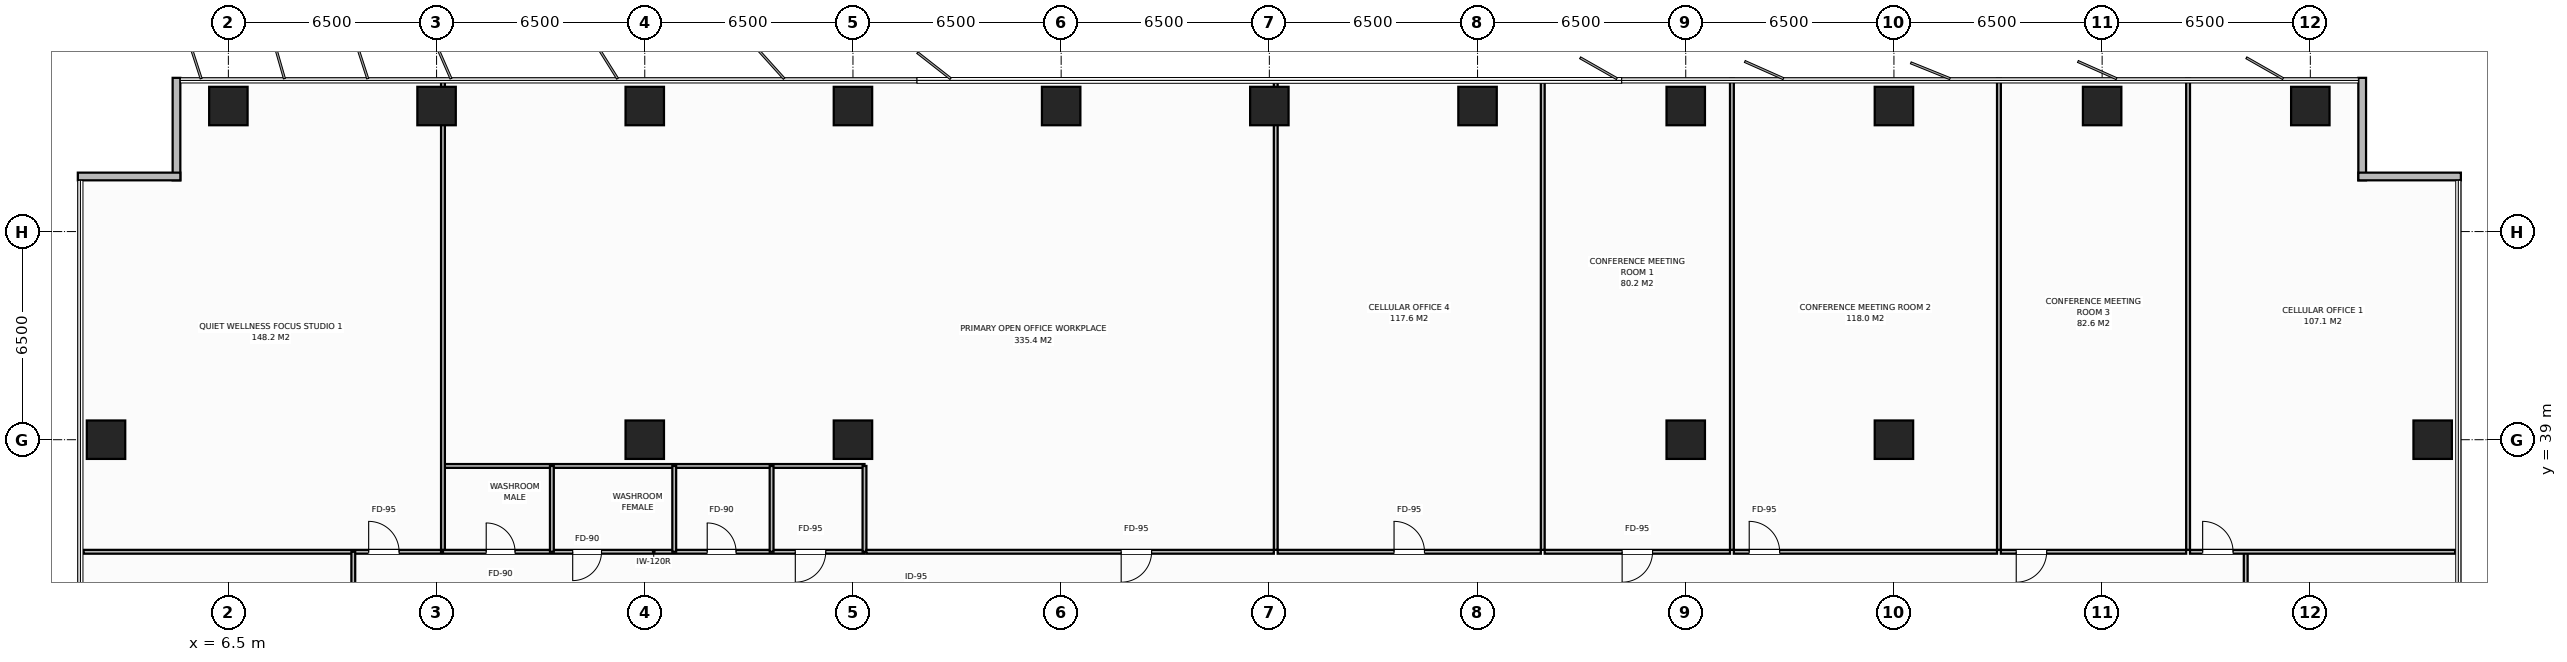
"""IFC4 building model, lengths in metres.
Left out: names, types, materials, properties, quantities, classifications, styles, units other than length and angle.
Written with IfcOpenShell. Run it as: python <this file> out.ifc"""

import sys

from ifc_helpers import new_model, si_unit, direction, frame, frame_2d, origin, origin_2d, place, context, subcontext, project, spatial, rectangle, extrude, element, fill, save


model = new_model("IFC4")
c1 = context("Model", 3, precision=1e-05, world=origin(), true_north=direction((0.0, 1.0)))
c2 = subcontext(c1, "Body", "Model", "MODEL_VIEW")
j1 = project(units=[si_unit("LENGTHUNIT", "METRE"), si_unit("PLANEANGLEUNIT", "RADIAN")], contexts=[c1])
p1 = place(None, origin())
s1 = spatial("IfcSite", under=j1, at=p1, CompositionType="ELEMENT")
p2 = place(p1, origin())
s2 = spatial("IfcBuilding", under=s1, at=p2, CompositionType="ELEMENT")
p3 = place(p2, frame((0.0, 0.0, 105.0)))
s3 = spatial("IfcBuildingStorey", under=s2, at=p3, CompositionType="ELEMENT", Elevation=105.0)
for number, where, z_axis, x_axis in (
    (1, (19.5, 39.0, 0.0), (0.0, 0.0, 1.0), (1.0, 0.0, 0.0)),
    (2, (58.5, 39.0, 0.0), (0.0, 0.0, 1.0), (1.0, 0.0, 0.0)),
    (3, (26.0, 39.0, 0.0), (0.0, 0.0, 1.0), (1.0, 0.0, 0.0)),
    (4, (52.0, 39.0, 0.0), (0.0, 0.0, 1.0), (1.0, 0.0, 0.0)),
    (5, (6.5, 49.42, 0.0), (0.0, 0.0, 1.0), (1.0, 0.0, 0.0)),
    (6, (13.0, 49.42, 0.0), (0.0, 0.0, 1.0), (1.0, 0.0, 0.0)),
    (7, (19.5, 49.42, 0.0), (0.0, 0.0, 1.0), (1.0, 0.0, 0.0)),
    (8, (26.0, 49.42, 0.0), (0.0, 0.0, 1.0), (1.0, 0.0, 0.0)),
    (9, (32.5, 49.42, 0.0), (0.0, 0.0, 1.0), (1.0, 0.0, 0.0)),
    (10, (39.0, 49.42, 0.0), (0.0, 0.0, 1.0), (1.0, 0.0, 0.0)),
    (11, (45.5, 49.42, 0.0), (0.0, 0.0, 1.0), (1.0, 0.0, 0.0)),
    (12, (52.0, 49.42, 0.0), (0.0, 0.0, 1.0), (1.0, 0.0, 0.0)),
    (13, (58.5, 49.42, 0.0), (0.0, 0.0, 1.0), (1.0, 0.0, 0.0)),
    (14, (65.0, 49.42, 0.0), (0.0, 0.0, 1.0), (1.0, 0.0, 0.0)),
    (15, (71.5, 49.42, 0.0), (0.0, 0.0, 1.0), (1.0, 0.0, 0.0)),
    (16, (2.68, 39.0, 0.0), (0.0, 0.0, 1.0), (1.0, 0.0, 0.0)),
    (17, (75.32, 39.0, 0.0), (0.0, 0.0, 1.0), (1.0, 0.0, 0.0)),
):
    element("IfcColumn", number, at=place(p3, frame(where, z_axis=z_axis, x_axis=x_axis)), inside=s3, PredefinedType="COLUMN", context=c2, shape_type="SweptSolid", body=[
        extrude(rectangle(XDim=1.2, YDim=1.2, at=origin_2d()), origin(), (0.0, 0.0, 1.0), 3.8),
    ])
for number, where, z_axis, x_axis in (
    (18, (4.88, 47.1, 0.0), (0.0, 0.0, 1.0), (0.0, 1.0, 0.0)),
    (19, (1.8, 47.22, 0.0), (0.0, 0.0, 1.0), (1.0, 0.0, 0.0)),
    (20, (73.12, 50.3, 0.0), (0.0, 0.0, 1.0), (0.0, -1.0, 0.0)),
    (21, (73.0, 47.22, 0.0), (0.0, 0.0, 1.0), (1.0, 0.0, 0.0)),
):
    element("IfcWall", number, at=place(p3, frame(where, z_axis=z_axis, x_axis=x_axis)), inside=s3, PredefinedType="STANDARD", context=c2, shape_type="SweptSolid", body=[
        extrude(rectangle(XDim=3.2, YDim=0.24, at=frame_2d((1.6, 0.0))), origin(), (0.0, 0.0, 1.0), 3.565),
    ])
p4 = place(p3, frame((69.483, 33.4, 0.0), z_axis=(0.0, 0.0, 1.0), x_axis=(0.0, 1.0, 0.0)))
e22 = element("IfcWall", 22, at=p4, inside=s3, PredefinedType="PARTITIONING", context=c2, shape_type="SweptSolid", body=[
    extrude(rectangle(XDim=2.1, YDim=0.12, at=frame_2d((1.05, 0.0))), origin(), (0.0, 0.0, 1.0), 3.565),
])
p5 = place(p3, frame((13.2, 35.5, 0.0), z_axis=(0.0, 0.0, 1.0), x_axis=(1.0, 0.0, 0.0)))
e23 = element("IfcWall", 23, at=p5, inside=s3, PredefinedType="PARTITIONING", context=c2, shape_type="SweptSolid", body=[
    extrude(rectangle(XDim=13.16, YDim=0.12, at=frame_2d((6.58, 0.0))), origin(), (0.0, 0.0, 1.0), 3.565),
])
p6 = place(p5, frame((1.35, 0.0, 0.0)))
e24 = element("IfcOpeningElement", 24, at=p6, cuts=e23, PredefinedType="OPENING", context=c2, shape_type="SweptSolid", body=[
    extrude(rectangle(XDim=0.9, YDim=2.15, at=frame_2d((0.45, 1.075))), frame((0.0, 0.07, 0.0), z_axis=(0.0, -1.0, 0.0), x_axis=(1.0, 0.0, 0.0)), (0.0, 0.0, 1.0), 0.14),
])
p7 = place(p5, frame((4.05, 0.0, 0.0)))
e25 = element("IfcOpeningElement", 25, at=p7, cuts=e23, PredefinedType="OPENING", context=c2, shape_type="SweptSolid", body=[
    extrude(rectangle(XDim=0.9, YDim=2.15, at=frame_2d((0.45, 1.075))), frame((0.0, 0.07, 0.0), z_axis=(0.0, -1.0, 0.0), x_axis=(1.0, 0.0, 0.0)), (0.0, 0.0, 1.0), 0.14),
])
p8 = place(p5, frame((8.25, 0.0, 0.0)))
e26 = element("IfcOpeningElement", 26, at=p8, cuts=e23, PredefinedType="OPENING", context=c2, shape_type="SweptSolid", body=[
    extrude(rectangle(XDim=0.9, YDim=2.15, at=frame_2d((0.45, 1.075))), frame((0.0, 0.07, 0.0), z_axis=(0.0, -1.0, 0.0), x_axis=(1.0, 0.0, 0.0)), (0.0, 0.0, 1.0), 0.14),
])
p9 = place(p5, frame((11.0, 0.0, 0.0)))
e27 = element("IfcOpeningElement", 27, at=p9, cuts=e23, PredefinedType="OPENING", context=c2, shape_type="SweptSolid", body=[
    extrude(rectangle(XDim=0.95, YDim=2.15, at=frame_2d((0.475, 1.075))), frame((0.0, 0.07, 0.0), z_axis=(0.0, -1.0, 0.0), x_axis=(1.0, 0.0, 0.0)), (0.0, 0.0, 1.0), 0.14),
])
p10 = place(p3, frame((13.2, 38.18, 0.0), z_axis=(0.0, 0.0, 1.0), x_axis=(1.0, 0.0, 0.0)))
e28 = element("IfcWall", 28, at=p10, inside=s3, PredefinedType="PARTITIONING", context=c2, shape_type="SweptSolid", body=[
    extrude(rectangle(XDim=13.16, YDim=0.12, at=frame_2d((6.58, 0.0))), origin(), (0.0, 0.0, 1.0), 3.565),
])
for number, where, z_axis, x_axis in (
    (29, (16.6, 35.5, 0.0), (0.0, 0.0, 1.0), (0.0, 1.0, 0.0)),
    (30, (20.42, 35.5, 0.0), (0.0, 0.0, 1.0), (0.0, 1.0, 0.0)),
    (31, (23.46, 35.5, 0.0), (0.0, 0.0, 1.0), (0.0, 1.0, 0.0)),
    (32, (26.36, 35.5, 0.0), (0.0, 0.0, 1.0), (0.0, 1.0, 0.0)),
):
    element("IfcWall", number, at=place(p3, frame(where, z_axis=z_axis, x_axis=x_axis)), inside=s3, PredefinedType="PARTITIONING", context=c2, shape_type="SweptSolid", body=[
        extrude(rectangle(XDim=2.68, YDim=0.12, at=frame_2d((1.34, 0.0))), origin(), (0.0, 0.0, 1.0), 3.565),
    ])
p11 = place(p3, frame((13.2, 35.56, 0.0), z_axis=(0.0, 0.0, 1.0), x_axis=(0.0, 1.0, 0.0)))
e33 = element("IfcWall", 33, at=p11, inside=s3, PredefinedType="PARTITIONING", context=c2, shape_type="SweptSolid", body=[
    extrude(rectangle(XDim=14.72, YDim=0.12, at=frame_2d((7.36, 0.0))), origin(), (0.0, 0.0, 1.0), 2.965),
])
p12 = place(p3, frame((1.98, 35.5, 0.0), z_axis=(0.0, 0.0, 1.0), x_axis=(1.0, 0.0, 0.0)))
e34 = element("IfcWall", 34, at=p12, inside=s3, PredefinedType="PARTITIONING", context=c2, shape_type="SweptSolid", body=[
    extrude(rectangle(XDim=11.16, YDim=0.12, at=frame_2d((5.58, 0.0))), origin(), (0.0, 0.0, 1.0), 3.565),
])
p13 = place(p12, frame((8.9, 0.0, 0.0)))
e35 = element("IfcOpeningElement", 35, at=p13, cuts=e34, PredefinedType="OPENING", context=c2, shape_type="SweptSolid", body=[
    extrude(rectangle(XDim=0.95, YDim=2.15, at=frame_2d((0.475, 1.075))), frame((0.0, 0.07, 0.0), z_axis=(0.0, -1.0, 0.0), x_axis=(1.0, 0.0, 0.0)), (0.0, 0.0, 1.0), 0.14),
])
p14 = place(p3, frame((39.2, 35.56, 0.0), z_axis=(0.0, 0.0, 1.0), x_axis=(0.0, 1.0, 0.0)))
e36 = element("IfcWall", 36, at=p14, inside=s3, PredefinedType="PARTITIONING", context=c2, shape_type="SweptSolid", body=[
    extrude(rectangle(XDim=14.72, YDim=0.12, at=frame_2d((7.36, 0.0))), origin(), (0.0, 0.0, 1.0), 2.965),
])
p15 = place(p3, frame((26.42, 35.5, 0.0), z_axis=(0.0, 0.0, 1.0), x_axis=(1.0, 0.0, 0.0)))
e37 = element("IfcWall", 37, at=p15, inside=s3, PredefinedType="PARTITIONING", context=c2, shape_type="SweptSolid", body=[
    extrude(rectangle(XDim=12.72, YDim=0.12, at=frame_2d((6.36, 0.0))), origin(), (0.0, 0.0, 1.0), 3.565),
])
p16 = place(p15, frame((7.954, 0.0, 0.0)))
e38 = element("IfcOpeningElement", 38, at=p16, cuts=e37, PredefinedType="OPENING", context=c2, shape_type="SweptSolid", body=[
    extrude(rectangle(XDim=0.95, YDim=2.15, at=frame_2d((0.475, 1.075))), frame((0.0, 0.07, 0.0), z_axis=(0.0, -1.0, 0.0), x_axis=(1.0, 0.0, 0.0)), (0.0, 0.0, 1.0), 0.14),
])
p17 = place(p3, frame((47.537, 35.56, 0.0), z_axis=(0.0, 0.0, 1.0), x_axis=(0.0, 1.0, 0.0)))
e39 = element("IfcWall", 39, at=p17, inside=s3, PredefinedType="PARTITIONING", context=c2, shape_type="SweptSolid", body=[
    extrude(rectangle(XDim=14.72, YDim=0.12, at=frame_2d((7.36, 0.0))), origin(), (0.0, 0.0, 1.0), 3.565),
])
p18 = place(p3, frame((39.26, 35.5, 0.0), z_axis=(0.0, 0.0, 1.0), x_axis=(1.0, 0.0, 0.0)))
e40 = element("IfcWall", 40, at=p18, inside=s3, PredefinedType="PARTITIONING", context=c2, shape_type="SweptSolid", body=[
    extrude(rectangle(XDim=8.217, YDim=0.12, at=frame_2d((4.108, 0.0))), origin(), (0.0, 0.0, 1.0), 3.565),
])
p19 = place(p18, frame((3.633, 0.0, 0.0)))
e41 = element("IfcOpeningElement", 41, at=p19, cuts=e40, PredefinedType="OPENING", context=c2, shape_type="SweptSolid", body=[
    extrude(rectangle(XDim=0.95, YDim=2.15, at=frame_2d((0.475, 1.075))), frame((0.0, 0.07, 0.0), z_axis=(0.0, -1.0, 0.0), x_axis=(1.0, 0.0, 0.0)), (0.0, 0.0, 1.0), 0.14),
])
p20 = place(p3, frame((53.442, 35.56, 0.0), z_axis=(0.0, 0.0, 1.0), x_axis=(0.0, 1.0, 0.0)))
e42 = element("IfcWall", 42, at=p20, inside=s3, PredefinedType="PARTITIONING", context=c2, shape_type="SweptSolid", body=[
    extrude(rectangle(XDim=14.72, YDim=0.12, at=frame_2d((7.36, 0.0))), origin(), (0.0, 0.0, 1.0), 3.565),
])
p21 = place(p3, frame((47.597, 35.5, 0.0), z_axis=(0.0, 0.0, 1.0), x_axis=(1.0, 0.0, 0.0)))
e43 = element("IfcWall", 43, at=p21, inside=s3, PredefinedType="PARTITIONING", context=c2, shape_type="SweptSolid", body=[
    extrude(rectangle(XDim=5.785, YDim=0.12, at=frame_2d((2.893, 0.0))), origin(), (0.0, 0.0, 1.0), 3.565),
])
p22 = place(p21, frame((2.417, 0.0, 0.0)))
e44 = element("IfcOpeningElement", 44, at=p22, cuts=e43, PredefinedType="OPENING", context=c2, shape_type="SweptSolid", body=[
    extrude(rectangle(XDim=0.95, YDim=2.15, at=frame_2d((0.475, 1.075))), frame((0.0, 0.07, 0.0), z_axis=(0.0, -1.0, 0.0), x_axis=(1.0, 0.0, 0.0)), (0.0, 0.0, 1.0), 0.14),
])
p23 = place(p3, frame((61.778, 35.56, 0.0), z_axis=(0.0, 0.0, 1.0), x_axis=(0.0, 1.0, 0.0)))
e45 = element("IfcWall", 45, at=p23, inside=s3, PredefinedType="PARTITIONING", context=c2, shape_type="SweptSolid", body=[
    extrude(rectangle(XDim=14.72, YDim=0.12, at=frame_2d((7.36, 0.0))), origin(), (0.0, 0.0, 1.0), 3.565),
])
p24 = place(p3, frame((53.502, 35.5, 0.0), z_axis=(0.0, 0.0, 1.0), x_axis=(1.0, 0.0, 0.0)))
e46 = element("IfcWall", 46, at=p24, inside=s3, PredefinedType="PARTITIONING", context=c2, shape_type="SweptSolid", body=[
    extrude(rectangle(XDim=8.217, YDim=0.12, at=frame_2d((4.108, 0.0))), origin(), (0.0, 0.0, 1.0), 3.565),
])
p25 = place(p24, frame((0.48, 0.0, 0.0)))
e47 = element("IfcOpeningElement", 47, at=p25, cuts=e46, PredefinedType="OPENING", context=c2, shape_type="SweptSolid", body=[
    extrude(rectangle(XDim=0.95, YDim=2.15, at=frame_2d((0.475, 1.075))), frame((0.0, 0.07, 0.0), z_axis=(0.0, -1.0, 0.0), x_axis=(1.0, 0.0, 0.0)), (0.0, 0.0, 1.0), 0.14),
])
p26 = place(p3, frame((67.683, 35.56, 0.0), z_axis=(0.0, 0.0, 1.0), x_axis=(0.0, 1.0, 0.0)))
e48 = element("IfcWall", 48, at=p26, inside=s3, PredefinedType="PARTITIONING", context=c2, shape_type="SweptSolid", body=[
    extrude(rectangle(XDim=14.72, YDim=0.12, at=frame_2d((7.36, 0.0))), origin(), (0.0, 0.0, 1.0), 3.565),
])
p27 = place(p3, frame((61.838, 35.5, 0.0), z_axis=(0.0, 0.0, 1.0), x_axis=(1.0, 0.0, 0.0)))
e49 = element("IfcWall", 49, at=p27, inside=s3, PredefinedType="PARTITIONING", context=c2, shape_type="SweptSolid", body=[
    extrude(rectangle(XDim=5.785, YDim=0.12, at=frame_2d((2.893, 0.0))), origin(), (0.0, 0.0, 1.0), 3.565),
])
p28 = place(p27, frame((0.48, 0.0, 0.0)))
e50 = element("IfcOpeningElement", 50, at=p28, cuts=e49, PredefinedType="OPENING", context=c2, shape_type="SweptSolid", body=[
    extrude(rectangle(XDim=0.95, YDim=2.15, at=frame_2d((0.475, 1.075))), frame((0.0, 0.07, 0.0), z_axis=(0.0, -1.0, 0.0), x_axis=(1.0, 0.0, 0.0)), (0.0, 0.0, 1.0), 0.14),
])
p29 = place(p3, frame((67.743, 35.5, 0.0), z_axis=(0.0, 0.0, 1.0), x_axis=(1.0, 0.0, 0.0)))
e51 = element("IfcWall", 51, at=p29, inside=s3, PredefinedType="PARTITIONING", context=c2, shape_type="SweptSolid", body=[
    extrude(rectangle(XDim=8.277, YDim=0.12, at=frame_2d((4.138, 0.0))), origin(), (0.0, 0.0, 1.0), 3.565),
])
p30 = place(p29, frame((0.395, 0.0, 0.0)))
e52 = element("IfcOpeningElement", 52, at=p30, cuts=e51, PredefinedType="OPENING", context=c2, shape_type="SweptSolid", body=[
    extrude(rectangle(XDim=0.95, YDim=2.15, at=frame_2d((0.475, 1.075))), frame((0.0, 0.07, 0.0), z_axis=(0.0, -1.0, 0.0), x_axis=(1.0, 0.0, 0.0)), (0.0, 0.0, 1.0), 0.14),
])
p31 = place(p3, frame((10.4, 26.0, 0.0), z_axis=(0.0, 0.0, 1.0), x_axis=(0.0, 1.0, 0.0)))
e53 = element("IfcWall", 53, at=p31, inside=s3, PredefinedType="PARTITIONING", context=c2, shape_type="SweptSolid", body=[
    extrude(rectangle(XDim=9.5, YDim=0.12, at=frame_2d((4.75, 0.0))), origin(), (0.0, 0.0, 1.0), 3.565),
])
p32 = place(p31, frame((3.225, 0.0, 0.0)))
e54 = element("IfcOpeningElement", 54, at=p32, cuts=e53, PredefinedType="OPENING", context=c2, shape_type="SweptSolid", body=[
    extrude(rectangle(XDim=0.95, YDim=2.15, at=frame_2d((0.475, 1.075))), frame((0.0, 0.07, 0.0), z_axis=(0.0, -1.0, 0.0), x_axis=(1.0, 0.0, 0.0)), (0.0, 0.0, 1.0), 0.14),
])
p33 = place(p6, origin())
e55 = element("IfcDoor", 55, at=p33, inside=s3, OperationType="SINGLE_SWING_LEFT", PredefinedType="DOOR", context=c2, shape_type="SweptSolid", body=[
    extrude(rectangle(XDim=0.9, YDim=2.15, at=frame_2d((0.45, 1.075))), frame((0.0, 0.025, 0.0), z_axis=(0.0, -1.0, 0.0), x_axis=(1.0, 0.0, 0.0)), (0.0, 0.0, 1.0), 0.05),
])
fill(e24, e55)
p34 = place(p7, origin())
e56 = element("IfcDoor", 56, at=p34, inside=s3, OperationType="SINGLE_SWING_RIGHT", PredefinedType="DOOR", context=c2, shape_type="SweptSolid", body=[
    extrude(rectangle(XDim=0.9, YDim=2.15, at=frame_2d((0.45, 1.075))), frame((0.0, 0.025, 0.0), z_axis=(0.0, -1.0, 0.0), x_axis=(1.0, 0.0, 0.0)), (0.0, 0.0, 1.0), 0.05),
])
fill(e25, e56)
p35 = place(p8, origin())
e57 = element("IfcDoor", 57, at=p35, inside=s3, OperationType="SINGLE_SWING_LEFT", PredefinedType="DOOR", context=c2, shape_type="SweptSolid", body=[
    extrude(rectangle(XDim=0.9, YDim=2.15, at=frame_2d((0.45, 1.075))), frame((0.0, 0.025, 0.0), z_axis=(0.0, -1.0, 0.0), x_axis=(1.0, 0.0, 0.0)), (0.0, 0.0, 1.0), 0.05),
])
fill(e26, e57)
p36 = place(p9, origin())
e58 = element("IfcDoor", 58, at=p36, inside=s3, OperationType="SINGLE_SWING_RIGHT", PredefinedType="DOOR", context=c2, shape_type="SweptSolid", body=[
    extrude(rectangle(XDim=0.95, YDim=2.15, at=frame_2d((0.475, 1.075))), frame((0.0, 0.025, 0.0), z_axis=(0.0, -1.0, 0.0), x_axis=(1.0, 0.0, 0.0)), (0.0, 0.0, 1.0), 0.05),
])
fill(e27, e58)
p37 = place(p13, origin())
e59 = element("IfcDoor", 59, at=p37, inside=s3, OperationType="SINGLE_SWING_LEFT", PredefinedType="DOOR", context=c2, shape_type="SweptSolid", body=[
    extrude(rectangle(XDim=0.95, YDim=2.15, at=frame_2d((0.475, 1.075))), frame((0.0, 0.025, 0.0), z_axis=(0.0, -1.0, 0.0), x_axis=(1.0, 0.0, 0.0)), (0.0, 0.0, 1.0), 0.05),
])
fill(e35, e59)
p38 = place(p16, origin())
e60 = element("IfcDoor", 60, at=p38, inside=s3, OperationType="SINGLE_SWING_RIGHT", PredefinedType="DOOR", context=c2, shape_type="SweptSolid", body=[
    extrude(rectangle(XDim=0.95, YDim=2.15, at=frame_2d((0.475, 1.075))), frame((0.0, 0.025, 0.0), z_axis=(0.0, -1.0, 0.0), x_axis=(1.0, 0.0, 0.0)), (0.0, 0.0, 1.0), 0.05),
])
fill(e38, e60)
p39 = place(p19, origin())
e61 = element("IfcDoor", 61, at=p39, inside=s3, OperationType="SINGLE_SWING_LEFT", PredefinedType="DOOR", context=c2, shape_type="SweptSolid", body=[
    extrude(rectangle(XDim=0.95, YDim=2.15, at=frame_2d((0.475, 1.075))), frame((0.0, 0.025, 0.0), z_axis=(0.0, -1.0, 0.0), x_axis=(1.0, 0.0, 0.0)), (0.0, 0.0, 1.0), 0.05),
])
fill(e41, e61)
p40 = place(p22, origin())
e62 = element("IfcDoor", 62, at=p40, inside=s3, OperationType="SINGLE_SWING_RIGHT", PredefinedType="DOOR", context=c2, shape_type="SweptSolid", body=[
    extrude(rectangle(XDim=0.95, YDim=2.15, at=frame_2d((0.475, 1.075))), frame((0.0, 0.025, 0.0), z_axis=(0.0, -1.0, 0.0), x_axis=(1.0, 0.0, 0.0)), (0.0, 0.0, 1.0), 0.05),
])
fill(e44, e62)
p41 = place(p25, origin())
e63 = element("IfcDoor", 63, at=p41, inside=s3, OperationType="SINGLE_SWING_LEFT", PredefinedType="DOOR", context=c2, shape_type="SweptSolid", body=[
    extrude(rectangle(XDim=0.95, YDim=2.15, at=frame_2d((0.475, 1.075))), frame((0.0, 0.025, 0.0), z_axis=(0.0, -1.0, 0.0), x_axis=(1.0, 0.0, 0.0)), (0.0, 0.0, 1.0), 0.05),
])
fill(e47, e63)
p42 = place(p28, origin())
e64 = element("IfcDoor", 64, at=p42, inside=s3, OperationType="SINGLE_SWING_RIGHT", PredefinedType="DOOR", context=c2, shape_type="SweptSolid", body=[
    extrude(rectangle(XDim=0.95, YDim=2.15, at=frame_2d((0.475, 1.075))), frame((0.0, 0.025, 0.0), z_axis=(0.0, -1.0, 0.0), x_axis=(1.0, 0.0, 0.0)), (0.0, 0.0, 1.0), 0.05),
])
fill(e50, e64)
p43 = place(p30, origin())
e65 = element("IfcDoor", 65, at=p43, inside=s3, OperationType="SINGLE_SWING_LEFT", PredefinedType="DOOR", context=c2, shape_type="SweptSolid", body=[
    extrude(rectangle(XDim=0.95, YDim=2.15, at=frame_2d((0.475, 1.075))), frame((0.0, 0.025, 0.0), z_axis=(0.0, -1.0, 0.0), x_axis=(1.0, 0.0, 0.0)), (0.0, 0.0, 1.0), 0.05),
])
fill(e52, e65)
save(model, sys.argv[1])
